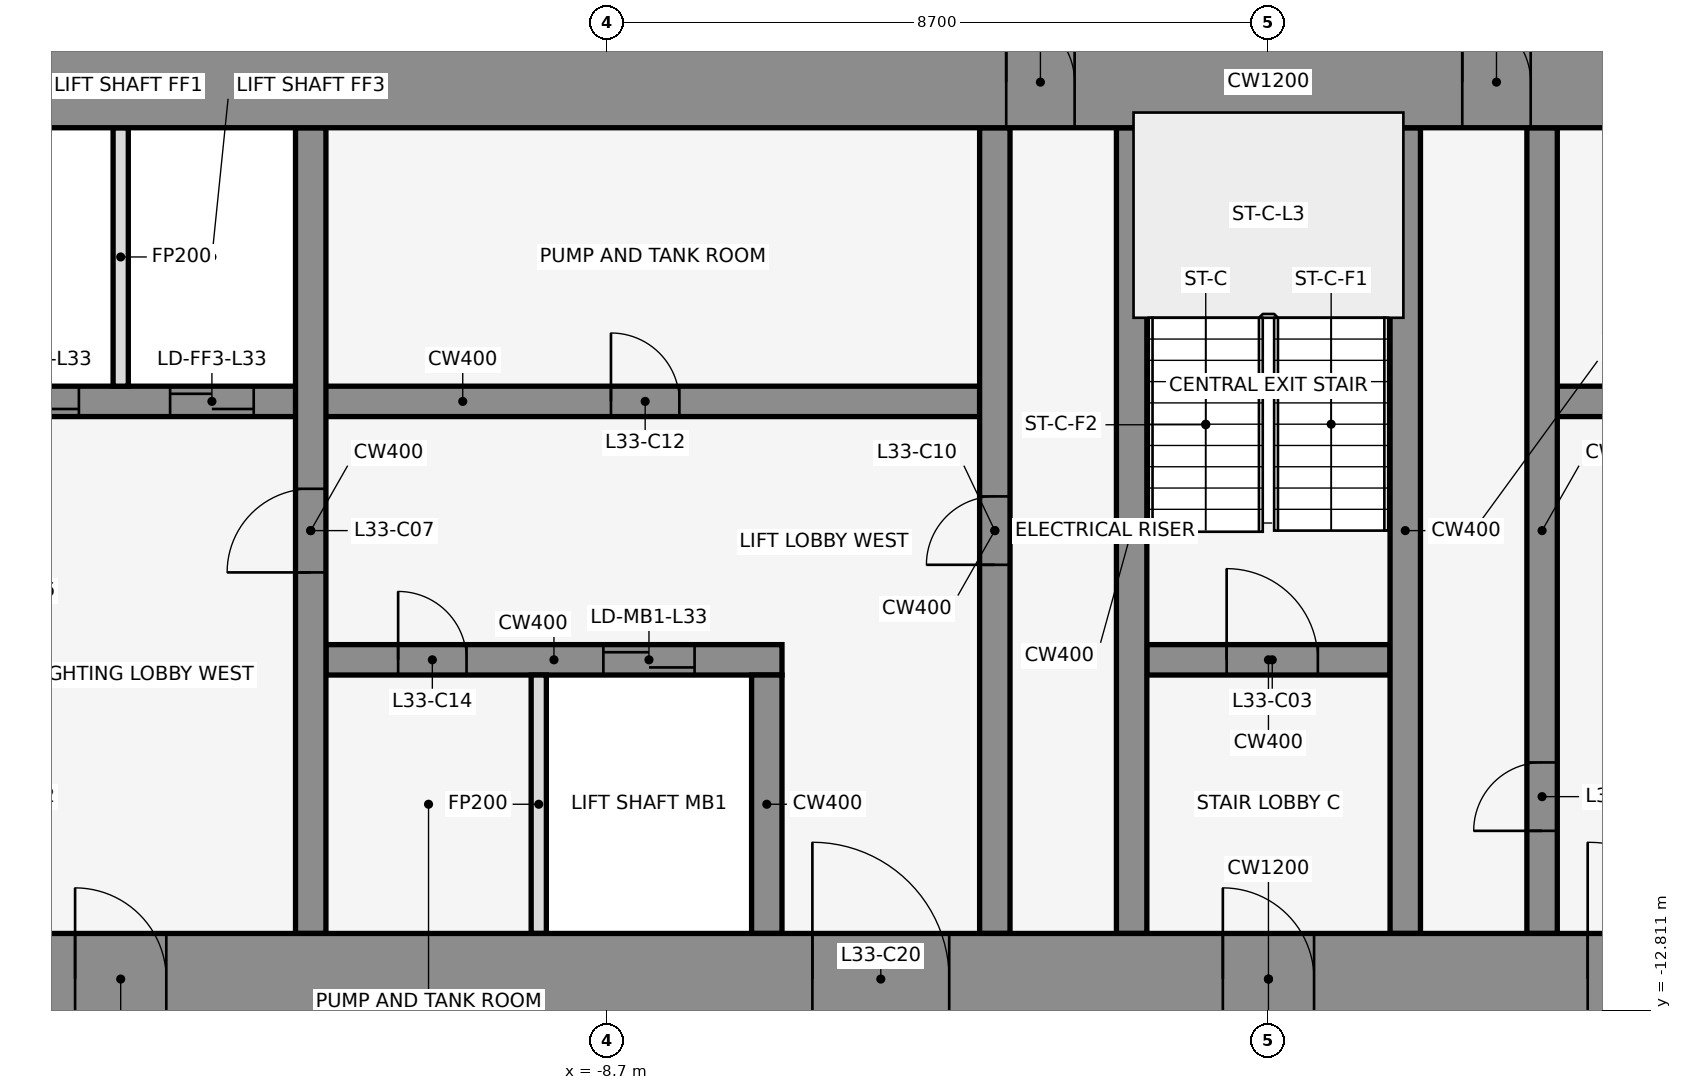
"""IFC4 building model, lengths in metres.
Left out: names, types, materials, properties, quantities, classifications, styles, units other than length and angle.
Written with IfcOpenShell. Run it as: python <this file> out.ifc"""

import sys

from ifc_helpers import new_model, si_unit, direction, frame, frame_2d, origin, place, context, subcontext, project, spatial, rectangle, extrude, element, fill, save


model = new_model("IFC4")
c1 = context("Model", 3, precision=1e-05, world=origin(), true_north=direction((0.0, 1.0)))
c2 = subcontext(c1, "Body", "Model", "MODEL_VIEW")
j1 = project(units=[si_unit("LENGTHUNIT", "METRE"), si_unit("PLANEANGLEUNIT", "RADIAN")], contexts=[c1])
p1 = place(None, origin())
s1 = spatial("IfcSite", under=j1, at=p1, CompositionType="ELEMENT")
p2 = place(p1, origin())
s2 = spatial("IfcBuilding", under=s1, at=p2, CompositionType="ELEMENT")
p3 = place(p2, frame((0.0, 0.0, 152.7)))
s3 = spatial("IfcBuildingStorey", under=s2, at=p3, CompositionType="ELEMENT", Elevation=152.7)
for number, where, z_axis, x_axis in (
    (1, (1.901, 1.08, 0.0), (0.0, 0.0, 1.0), (-0.84, -0.543, 0.0)),
    (2, (-0.068, -0.105, 0.0), (0.0, 0.0, 1.0), (-0.84, 0.543, 0.0)),
    (3, (-14.599, 1.08, 0.0), (0.0, 0.0, 1.0), (-0.84, -0.543, 0.0)),
):
    element("IfcWall", number, at=place(p3, frame(where, z_axis=z_axis, x_axis=x_axis)), inside=s3, PredefinedType="STANDARD", context=c2, shape_type="SweptSolid", body=[
        extrude(rectangle(XDim=2.183, YDim=0.25, at=frame_2d((1.091, 0.0))), origin(), (0.0, 0.0, 1.0), 3.95),
    ])
p4 = place(p3, frame((-12.4, -8.2, 0.0), z_axis=(0.0, 0.0, 1.0), x_axis=(1.0, 0.0, 0.0)))
e4 = element("IfcWall", 4, at=p4, inside=s3, PredefinedType="SHEAR", context=c2, shape_type="SweptSolid", body=[
    extrude(rectangle(XDim=6.0, YDim=0.4, at=frame_2d((3.0, 0.0))), origin(), (0.0, 0.0, 1.0), 4.1),
])
p5 = place(p4, frame((3.65, 0.0, 0.0)))
e5 = element("IfcOpeningElement", 5, at=p5, cuts=e4, PredefinedType="OPENING", context=c2, shape_type="SweptSolid", body=[
    extrude(rectangle(XDim=1.2, YDim=2.1, at=frame_2d((0.6, 1.05))), frame((0.0, 0.212, 0.0), z_axis=(0.0, -1.0, 0.0), x_axis=(1.0, 0.0, 0.0)), (0.0, 0.0, 1.0), 0.424),
])
p6 = place(p4, frame((0.95, 0.0, 0.0)))
e6 = element("IfcOpeningElement", 6, at=p6, cuts=e4, PredefinedType="OPENING", context=c2, shape_type="SweptSolid", body=[
    extrude(rectangle(XDim=0.9, YDim=2.1, at=frame_2d((0.45, 1.05))), frame((0.0, 0.212, 0.0), z_axis=(0.0, -1.0, 0.0), x_axis=(1.0, 0.0, 0.0)), (0.0, 0.0, 1.0), 0.424),
])
p7 = place(p3, frame((-1.6, -8.2, 0.0), z_axis=(0.0, 0.0, 1.0), x_axis=(1.0, 0.0, 0.0)))
e7 = element("IfcWall", 7, at=p7, inside=s3, PredefinedType="SHEAR", context=c2, shape_type="SweptSolid", body=[
    extrude(rectangle(XDim=3.2, YDim=0.4, at=frame_2d((1.6, 0.0))), origin(), (0.0, 0.0, 1.0), 4.1),
])
p8 = place(p7, frame((1.05, 0.0, 0.0)))
e8 = element("IfcOpeningElement", 8, at=p8, cuts=e7, PredefinedType="OPENING", context=c2, shape_type="SweptSolid", body=[
    extrude(rectangle(XDim=1.2, YDim=2.1, at=frame_2d((0.6, 1.05))), frame((0.0, 0.212, 0.0), z_axis=(0.0, -1.0, 0.0), x_axis=(1.0, 0.0, 0.0)), (0.0, 0.0, 1.0), 0.424),
])
p9 = place(p3, frame((-17.4, -4.8, 0.0), z_axis=(0.0, 0.0, 1.0), x_axis=(1.0, 0.0, 0.0)))
e9 = element("IfcWall", 9, at=p9, inside=s3, PredefinedType="SHEAR", context=c2, shape_type="SweptSolid", body=[
    extrude(rectangle(XDim=13.6, YDim=0.4, at=frame_2d((6.8, 0.0))), origin(), (0.0, 0.0, 1.0), 4.1),
])
p10 = place(p9, frame((0.65, 0.0, 0.0)))
e10 = element("IfcOpeningElement", 10, at=p10, cuts=e9, PredefinedType="OPENING", context=c2, shape_type="SweptSolid", body=[
    extrude(rectangle(XDim=1.1, YDim=2.1, at=frame_2d((0.55, 1.05))), frame((0.0, 0.212, 0.0), z_axis=(0.0, -1.0, 0.0), x_axis=(1.0, 0.0, 0.0)), (0.0, 0.0, 1.0), 0.424),
])
p11 = place(p9, frame((2.95, 0.0, 0.0)))
e11 = element("IfcOpeningElement", 11, at=p11, cuts=e9, PredefinedType="OPENING", context=c2, shape_type="SweptSolid", body=[
    extrude(rectangle(XDim=1.1, YDim=2.1, at=frame_2d((0.55, 1.05))), frame((0.0, 0.212, 0.0), z_axis=(0.0, -1.0, 0.0), x_axis=(1.0, 0.0, 0.0)), (0.0, 0.0, 1.0), 0.424),
])
p12 = place(p9, frame((8.75, 0.0, 0.0)))
e12 = element("IfcOpeningElement", 12, at=p12, cuts=e9, PredefinedType="OPENING", context=c2, shape_type="SweptSolid", body=[
    extrude(rectangle(XDim=0.9, YDim=2.1, at=frame_2d((0.45, 1.05))), frame((0.0, 0.212, 0.0), z_axis=(0.0, -1.0, 0.0), x_axis=(1.0, 0.0, 0.0)), (0.0, 0.0, 1.0), 0.424),
])
p13 = place(p3, frame((3.8, -4.8, 0.0), z_axis=(0.0, 0.0, 1.0), x_axis=(1.0, 0.0, 0.0)))
e13 = element("IfcWall", 13, at=p13, inside=s3, PredefinedType="SHEAR", context=c2, shape_type="SweptSolid", body=[
    extrude(rectangle(XDim=13.6, YDim=0.4, at=frame_2d((6.8, 0.0))), origin(), (0.0, 0.0, 1.0), 4.1),
])
p14 = place(p13, frame((9.45, 0.0, 0.0)))
e14 = element("IfcOpeningElement", 14, at=p14, cuts=e13, PredefinedType="OPENING", context=c2, shape_type="SweptSolid", body=[
    extrude(rectangle(XDim=1.1, YDim=2.1, at=frame_2d((0.55, 1.05))), frame((0.0, 0.212, 0.0), z_axis=(0.0, -1.0, 0.0), x_axis=(1.0, 0.0, 0.0)), (0.0, 0.0, 1.0), 0.424),
])
p15 = place(p13, frame((11.85, 0.0, 0.0)))
e15 = element("IfcOpeningElement", 15, at=p15, cuts=e13, PredefinedType="OPENING", context=c2, shape_type="SweptSolid", body=[
    extrude(rectangle(XDim=1.1, YDim=2.1, at=frame_2d((0.55, 1.05))), frame((0.0, 0.212, 0.0), z_axis=(0.0, -1.0, 0.0), x_axis=(1.0, 0.0, 0.0)), (0.0, 0.0, 1.0), 0.424),
])
p16 = place(p13, frame((3.95, 0.0, 0.0)))
e16 = element("IfcOpeningElement", 16, at=p16, cuts=e13, PredefinedType="OPENING", context=c2, shape_type="SweptSolid", body=[
    extrude(rectangle(XDim=0.9, YDim=2.1, at=frame_2d((0.45, 1.05))), frame((0.0, 0.212, 0.0), z_axis=(0.0, -1.0, 0.0), x_axis=(1.0, 0.0, 0.0)), (0.0, 0.0, 1.0), 0.424),
])
p17 = place(p3, frame((-15.1, -4.6, 0.0), z_axis=(0.0, 0.0, 1.0), x_axis=(0.0, 1.0, 0.0)))
e17 = element("IfcWall", 17, at=p17, inside=s3, PredefinedType="PARTITIONING", context=c2, shape_type="SweptSolid", body=[
    extrude(rectangle(XDim=3.4, YDim=0.2, at=frame_2d((1.7, 0.0))), origin(), (0.0, 0.0, 1.0), 2.84),
])
p18 = place(p3, frame((-12.6, -11.8, 0.0), z_axis=(0.0, 0.0, 1.0), x_axis=(0.0, 1.0, 0.0)))
e18 = element("IfcWall", 18, at=p18, inside=s3, PredefinedType="SHEAR", context=c2, shape_type="SweptSolid", body=[
    extrude(rectangle(XDim=10.6, YDim=0.4, at=frame_2d((5.3, 0.0))), origin(), (0.0, 0.0, 1.0), 4.1),
])
p19 = place(p18, frame((4.75, 0.0, 0.0)))
e19 = element("IfcOpeningElement", 19, at=p19, cuts=e18, PredefinedType="OPENING", context=c2, shape_type="SweptSolid", body=[
    extrude(rectangle(XDim=1.1, YDim=2.1, at=frame_2d((0.55, 1.05))), frame((0.0, 0.212, 0.0), z_axis=(0.0, -1.0, 0.0), x_axis=(1.0, 0.0, 0.0)), (0.0, 0.0, 1.0), 0.424),
])
p20 = place(p3, frame((-9.6, -11.8, 0.0), z_axis=(0.0, 0.0, 1.0), x_axis=(0.0, 1.0, 0.0)))
e20 = element("IfcWall", 20, at=p20, inside=s3, PredefinedType="PARTITIONING", context=c2, shape_type="SweptSolid", body=[
    extrude(rectangle(XDim=3.4, YDim=0.2, at=frame_2d((1.7, 0.0))), origin(), (0.0, 0.0, 1.0), 2.84),
])
p21 = place(p3, frame((-6.6, -11.8, 0.0), z_axis=(0.0, 0.0, 1.0), x_axis=(0.0, 1.0, 0.0)))
e21 = element("IfcWall", 21, at=p21, inside=s3, PredefinedType="SHEAR", context=c2, shape_type="SweptSolid", body=[
    extrude(rectangle(XDim=3.4, YDim=0.4, at=frame_2d((1.7, 0.0))), origin(), (0.0, 0.0, 1.0), 4.1),
])
p22 = place(p3, frame((-3.6, -11.8, 0.0), z_axis=(0.0, 0.0, 1.0), x_axis=(0.0, 1.0, 0.0)))
e22 = element("IfcWall", 22, at=p22, inside=s3, PredefinedType="SHEAR", context=c2, shape_type="SweptSolid", body=[
    extrude(rectangle(XDim=10.6, YDim=0.4, at=frame_2d((5.3, 0.0))), origin(), (0.0, 0.0, 1.0), 4.1),
])
p23 = place(p22, frame((4.85, 0.0, 0.0)))
e23 = element("IfcOpeningElement", 23, at=p23, cuts=e22, PredefinedType="OPENING", context=c2, shape_type="SweptSolid", body=[
    extrude(rectangle(XDim=0.9, YDim=2.1, at=frame_2d((0.45, 1.05))), frame((0.0, 0.212, 0.0), z_axis=(0.0, -1.0, 0.0), x_axis=(1.0, 0.0, 0.0)), (0.0, 0.0, 1.0), 0.424),
])
for number, where, z_axis, x_axis in (
    (24, (-1.8, -11.8, 0.0), (0.0, 0.0, 1.0), (0.0, 1.0, 0.0)),
    (25, (1.8, -11.8, 0.0), (0.0, 0.0, 1.0), (0.0, 1.0, 0.0)),
):
    element("IfcWall", number, at=place(p3, frame(where, z_axis=z_axis, x_axis=x_axis)), inside=s3, PredefinedType="SHEAR", context=c2, shape_type="SweptSolid", body=[
        extrude(rectangle(XDim=10.6, YDim=0.4, at=frame_2d((5.3, 0.0))), origin(), (0.0, 0.0, 1.0), 4.1),
    ])
p24 = place(p3, frame((3.6, -11.8, 0.0), z_axis=(0.0, 0.0, 1.0), x_axis=(0.0, 1.0, 0.0)))
e26 = element("IfcWall", 26, at=p24, inside=s3, PredefinedType="SHEAR", context=c2, shape_type="SweptSolid", body=[
    extrude(rectangle(XDim=10.6, YDim=0.4, at=frame_2d((5.3, 0.0))), origin(), (0.0, 0.0, 1.0), 4.1),
])
p25 = place(p24, frame((1.35, 0.0, 0.0)))
e27 = element("IfcOpeningElement", 27, at=p25, cuts=e26, PredefinedType="OPENING", context=c2, shape_type="SweptSolid", body=[
    extrude(rectangle(XDim=0.9, YDim=2.1, at=frame_2d((0.45, 1.05))), frame((0.0, 0.212, 0.0), z_axis=(0.0, -1.0, 0.0), x_axis=(1.0, 0.0, 0.0)), (0.0, 0.0, 1.0), 0.424),
])
p26 = place(p3, frame((-22.0, -0.6, 0.0), z_axis=(0.0, 0.0, 1.0), x_axis=(1.0, 0.0, 0.0)))
e28 = element("IfcWall", 28, at=p26, inside=s3, PredefinedType="SHEAR", context=c2, shape_type="SweptSolid", body=[
    extrude(rectangle(XDim=44.0, YDim=1.2, at=frame_2d((22.0, 0.0))), origin(), (0.0, 0.0, 1.0), 4.1),
])
p27 = place(p26, frame((18.55, 0.0, 0.0)))
e29 = element("IfcOpeningElement", 29, at=p27, cuts=e28, PredefinedType="OPENING", context=c2, shape_type="SweptSolid", body=[
    extrude(rectangle(XDim=0.9, YDim=2.1, at=frame_2d((0.45, 1.05))), frame((0.0, 0.612, 0.0), z_axis=(0.0, -1.0, 0.0), x_axis=(1.0, 0.0, 0.0)), (0.0, 0.0, 1.0), 1.224),
])
p28 = place(p26, frame((24.55, 0.0, 0.0)))
e30 = element("IfcOpeningElement", 30, at=p28, cuts=e28, PredefinedType="OPENING", context=c2, shape_type="SweptSolid", body=[
    extrude(rectangle(XDim=0.9, YDim=2.1, at=frame_2d((0.45, 1.05))), frame((0.0, 0.612, 0.0), z_axis=(0.0, -1.0, 0.0), x_axis=(1.0, 0.0, 0.0)), (0.0, 0.0, 1.0), 1.224),
])
p29 = place(p3, frame((-22.0, -12.4, 0.0), z_axis=(0.0, 0.0, 1.0), x_axis=(1.0, 0.0, 0.0)))
e31 = element("IfcWall", 31, at=p29, inside=s3, PredefinedType="SHEAR", context=c2, shape_type="SweptSolid", body=[
    extrude(rectangle(XDim=44.0, YDim=1.2, at=frame_2d((22.0, 0.0))), origin(), (0.0, 0.0, 1.0), 4.1),
])
p30 = place(p29, frame((2.2, 0.0, 0.0)))
e32 = element("IfcOpeningElement", 32, at=p30, cuts=e31, PredefinedType="OPENING", context=c2, shape_type="SweptSolid", body=[
    extrude(rectangle(XDim=1.2, YDim=2.1, at=frame_2d((0.6, 1.05))), frame((0.0, 0.612, 0.0), z_axis=(0.0, -1.0, 0.0), x_axis=(1.0, 0.0, 0.0)), (0.0, 0.0, 1.0), 1.224),
])
p31 = place(p29, frame((21.4, 0.0, 0.0)))
e33 = element("IfcOpeningElement", 33, at=p31, cuts=e31, PredefinedType="OPENING", context=c2, shape_type="SweptSolid", body=[
    extrude(rectangle(XDim=1.2, YDim=2.1, at=frame_2d((0.6, 1.05))), frame((0.0, 0.612, 0.0), z_axis=(0.0, -1.0, 0.0), x_axis=(1.0, 0.0, 0.0)), (0.0, 0.0, 1.0), 1.224),
])
p32 = place(p29, frame((40.6, 0.0, 0.0)))
e34 = element("IfcOpeningElement", 34, at=p32, cuts=e31, PredefinedType="OPENING", context=c2, shape_type="SweptSolid", body=[
    extrude(rectangle(XDim=1.2, YDim=2.1, at=frame_2d((0.6, 1.05))), frame((0.0, 0.612, 0.0), z_axis=(0.0, -1.0, 0.0), x_axis=(1.0, 0.0, 0.0)), (0.0, 0.0, 1.0), 1.224),
])
p33 = place(p29, frame((16.0, 0.0, 0.0)))
e35 = element("IfcOpeningElement", 35, at=p33, cuts=e31, PredefinedType="OPENING", context=c2, shape_type="SweptSolid", body=[
    extrude(rectangle(XDim=1.8, YDim=2.1, at=frame_2d((0.9, 1.05))), frame((0.0, 0.612, 0.0), z_axis=(0.0, -1.0, 0.0), x_axis=(1.0, 0.0, 0.0)), (0.0, 0.0, 1.0), 1.224),
])
p34 = place(p29, frame((6.3, 0.0, 0.0)))
e36 = element("IfcOpeningElement", 36, at=p34, cuts=e31, PredefinedType="OPENING", context=c2, shape_type="SweptSolid", body=[
    extrude(rectangle(XDim=1.2, YDim=2.1, at=frame_2d((0.6, 1.05))), frame((0.0, 0.612, 0.0), z_axis=(0.0, -1.0, 0.0), x_axis=(1.0, 0.0, 0.0)), (0.0, 0.0, 1.0), 1.224),
])
p35 = place(p29, frame((26.2, 0.0, 0.0)))
e37 = element("IfcOpeningElement", 37, at=p35, cuts=e31, PredefinedType="OPENING", context=c2, shape_type="SweptSolid", body=[
    extrude(rectangle(XDim=1.8, YDim=2.1, at=frame_2d((0.9, 1.05))), frame((0.0, 0.612, 0.0), z_axis=(0.0, -1.0, 0.0), x_axis=(1.0, 0.0, 0.0)), (0.0, 0.0, 1.0), 1.224),
])
p36 = place(p29, frame((36.5, 0.0, 0.0)))
e38 = element("IfcOpeningElement", 38, at=p36, cuts=e31, PredefinedType="OPENING", context=c2, shape_type="SweptSolid", body=[
    extrude(rectangle(XDim=1.2, YDim=2.1, at=frame_2d((0.6, 1.05))), frame((0.0, 0.612, 0.0), z_axis=(0.0, -1.0, 0.0), x_axis=(1.0, 0.0, 0.0)), (0.0, 0.0, 1.0), 1.224),
])
p37 = place(p8, origin())
e39 = element("IfcDoor", 39, at=p37, inside=s3, OperationType="SINGLE_SWING_LEFT", PredefinedType="DOOR", context=c2, shape_type="SweptSolid", body=[
    extrude(rectangle(XDim=1.2, YDim=2.1, at=frame_2d((0.6, 1.05))), frame((0.0, 0.025, 0.0), z_axis=(0.0, -1.0, 0.0), x_axis=(1.0, 0.0, 0.0)), (0.0, 0.0, 1.0), 0.05),
])
fill(e8, e39)
p38 = place(p10, origin())
e40 = element("IfcDoor", 40, at=p38, inside=s3, OperationType="DOUBLE_DOOR_SLIDING", PredefinedType="DOOR", context=c2, shape_type="SweptSolid", body=[
    extrude(rectangle(XDim=1.1, YDim=2.1, at=frame_2d((0.55, 1.05))), frame((0.0, 0.025, 0.0), z_axis=(0.0, -1.0, 0.0), x_axis=(1.0, 0.0, 0.0)), (0.0, 0.0, 1.0), 0.05),
])
fill(e10, e40)
p39 = place(p11, origin())
e41 = element("IfcDoor", 41, at=p39, inside=s3, OperationType="DOUBLE_DOOR_SLIDING", PredefinedType="DOOR", context=c2, shape_type="SweptSolid", body=[
    extrude(rectangle(XDim=1.1, YDim=2.1, at=frame_2d((0.55, 1.05))), frame((0.0, 0.025, 0.0), z_axis=(0.0, -1.0, 0.0), x_axis=(1.0, 0.0, 0.0)), (0.0, 0.0, 1.0), 0.05),
])
fill(e11, e41)
p40 = place(p5, origin())
e42 = element("IfcDoor", 42, at=p40, inside=s3, OperationType="DOUBLE_DOOR_SLIDING", PredefinedType="DOOR", context=c2, shape_type="SweptSolid", body=[
    extrude(rectangle(XDim=1.2, YDim=2.1, at=frame_2d((0.6, 1.05))), frame((0.0, 0.025, 0.0), z_axis=(0.0, -1.0, 0.0), x_axis=(1.0, 0.0, 0.0)), (0.0, 0.0, 1.0), 0.05),
])
fill(e5, e42)
p41 = place(p19, origin())
e43 = element("IfcDoor", 43, at=p41, inside=s3, OperationType="SINGLE_SWING_LEFT", PredefinedType="DOOR", context=c2, shape_type="SweptSolid", body=[
    extrude(rectangle(XDim=1.1, YDim=2.1, at=frame_2d((0.55, 1.05))), frame((0.0, 0.025, 0.0), z_axis=(0.0, -1.0, 0.0), x_axis=(1.0, 0.0, 0.0)), (0.0, 0.0, 1.0), 0.05),
])
fill(e19, e43)
p42 = place(p23, frame((0.9, 0.0, 0.0), z_axis=(0.0, 0.0, 1.0), x_axis=(-1.0, 0.0, 0.0)))
e44 = element("IfcDoor", 44, at=p42, inside=s3, OperationType="SINGLE_SWING_LEFT", PredefinedType="DOOR", context=c2, shape_type="SweptSolid", body=[
    extrude(rectangle(XDim=0.9, YDim=2.1, at=frame_2d((0.45, 1.05))), frame((0.0, 0.025, 0.0), z_axis=(0.0, -1.0, 0.0), x_axis=(1.0, 0.0, 0.0)), (0.0, 0.0, 1.0), 0.05),
])
fill(e23, e44)
p43 = place(p25, origin())
e45 = element("IfcDoor", 45, at=p43, inside=s3, OperationType="SINGLE_SWING_LEFT", PredefinedType="DOOR", context=c2, shape_type="SweptSolid", body=[
    extrude(rectangle(XDim=0.9, YDim=2.1, at=frame_2d((0.45, 1.05))), frame((0.0, 0.025, 0.0), z_axis=(0.0, -1.0, 0.0), x_axis=(1.0, 0.0, 0.0)), (0.0, 0.0, 1.0), 0.05),
])
fill(e27, e45)
p44 = place(p12, origin())
e46 = element("IfcDoor", 46, at=p44, inside=s3, OperationType="SINGLE_SWING_RIGHT", PredefinedType="DOOR", context=c2, shape_type="SweptSolid", body=[
    extrude(rectangle(XDim=0.9, YDim=2.1, at=frame_2d((0.45, 1.05))), frame((0.0, 0.025, 0.0), z_axis=(0.0, -1.0, 0.0), x_axis=(1.0, 0.0, 0.0)), (0.0, 0.0, 1.0), 0.05),
])
fill(e12, e46)
p45 = place(p6, frame((0.9, 0.0, 0.0), z_axis=(0.0, 0.0, 1.0), x_axis=(-1.0, 0.0, 0.0)))
e47 = element("IfcDoor", 47, at=p45, inside=s3, OperationType="SINGLE_SWING_LEFT", PredefinedType="DOOR", context=c2, shape_type="SweptSolid", body=[
    extrude(rectangle(XDim=0.9, YDim=2.1, at=frame_2d((0.45, 1.05))), frame((0.0, 0.025, 0.0), z_axis=(0.0, -1.0, 0.0), x_axis=(1.0, 0.0, 0.0)), (0.0, 0.0, 1.0), 0.05),
])
fill(e6, e47)
p46 = place(p27, origin())
e48 = element("IfcDoor", 48, at=p46, inside=s3, OperationType="SINGLE_SWING_LEFT", PredefinedType="DOOR", context=c2, shape_type="SweptSolid", body=[
    extrude(rectangle(XDim=0.9, YDim=2.1, at=frame_2d((0.45, 1.05))), frame((0.0, 0.025, 0.0), z_axis=(0.0, -1.0, 0.0), x_axis=(1.0, 0.0, 0.0)), (0.0, 0.0, 1.0), 0.05),
])
fill(e29, e48)
p47 = place(p28, origin())
e49 = element("IfcDoor", 49, at=p47, inside=s3, OperationType="SINGLE_SWING_LEFT", PredefinedType="DOOR", context=c2, shape_type="SweptSolid", body=[
    extrude(rectangle(XDim=0.9, YDim=2.1, at=frame_2d((0.45, 1.05))), frame((0.0, 0.025, 0.0), z_axis=(0.0, -1.0, 0.0), x_axis=(1.0, 0.0, 0.0)), (0.0, 0.0, 1.0), 0.05),
])
fill(e30, e49)
p48 = place(p31, frame((1.2, 0.0, 0.0), z_axis=(0.0, 0.0, 1.0), x_axis=(-1.0, 0.0, 0.0)))
e50 = element("IfcDoor", 50, at=p48, inside=s3, OperationType="SINGLE_SWING_RIGHT", PredefinedType="DOOR", context=c2, shape_type="SweptSolid", body=[
    extrude(rectangle(XDim=1.2, YDim=2.1, at=frame_2d((0.6, 1.05))), frame((0.0, 0.025, 0.0), z_axis=(0.0, -1.0, 0.0), x_axis=(1.0, 0.0, 0.0)), (0.0, 0.0, 1.0), 0.05),
])
fill(e33, e50)
p49 = place(p33, origin())
e51 = element("IfcDoor", 51, at=p49, inside=s3, OperationType="SINGLE_SWING_LEFT", PredefinedType="DOOR", context=c2, shape_type="SweptSolid", body=[
    extrude(rectangle(XDim=1.8, YDim=2.1, at=frame_2d((0.9, 1.05))), frame((0.0, 0.025, 0.0), z_axis=(0.0, -1.0, 0.0), x_axis=(1.0, 0.0, 0.0)), (0.0, 0.0, 1.0), 0.05),
])
fill(e35, e51)
p50 = place(p34, frame((1.2, 0.0, 0.0), z_axis=(0.0, 0.0, 1.0), x_axis=(-1.0, 0.0, 0.0)))
e52 = element("IfcDoor", 52, at=p50, inside=s3, OperationType="SINGLE_SWING_RIGHT", PredefinedType="DOOR", context=c2, shape_type="SweptSolid", body=[
    extrude(rectangle(XDim=1.2, YDim=2.1, at=frame_2d((0.6, 1.05))), frame((0.0, 0.025, 0.0), z_axis=(0.0, -1.0, 0.0), x_axis=(1.0, 0.0, 0.0)), (0.0, 0.0, 1.0), 0.05),
])
fill(e36, e52)
p51 = place(p35, origin())
e53 = element("IfcDoor", 53, at=p51, inside=s3, OperationType="SINGLE_SWING_LEFT", PredefinedType="DOOR", context=c2, shape_type="SweptSolid", body=[
    extrude(rectangle(XDim=1.8, YDim=2.1, at=frame_2d((0.9, 1.05))), frame((0.0, 0.025, 0.0), z_axis=(0.0, -1.0, 0.0), x_axis=(1.0, 0.0, 0.0)), (0.0, 0.0, 1.0), 0.05),
])
fill(e37, e53)
save(model, sys.argv[1])
